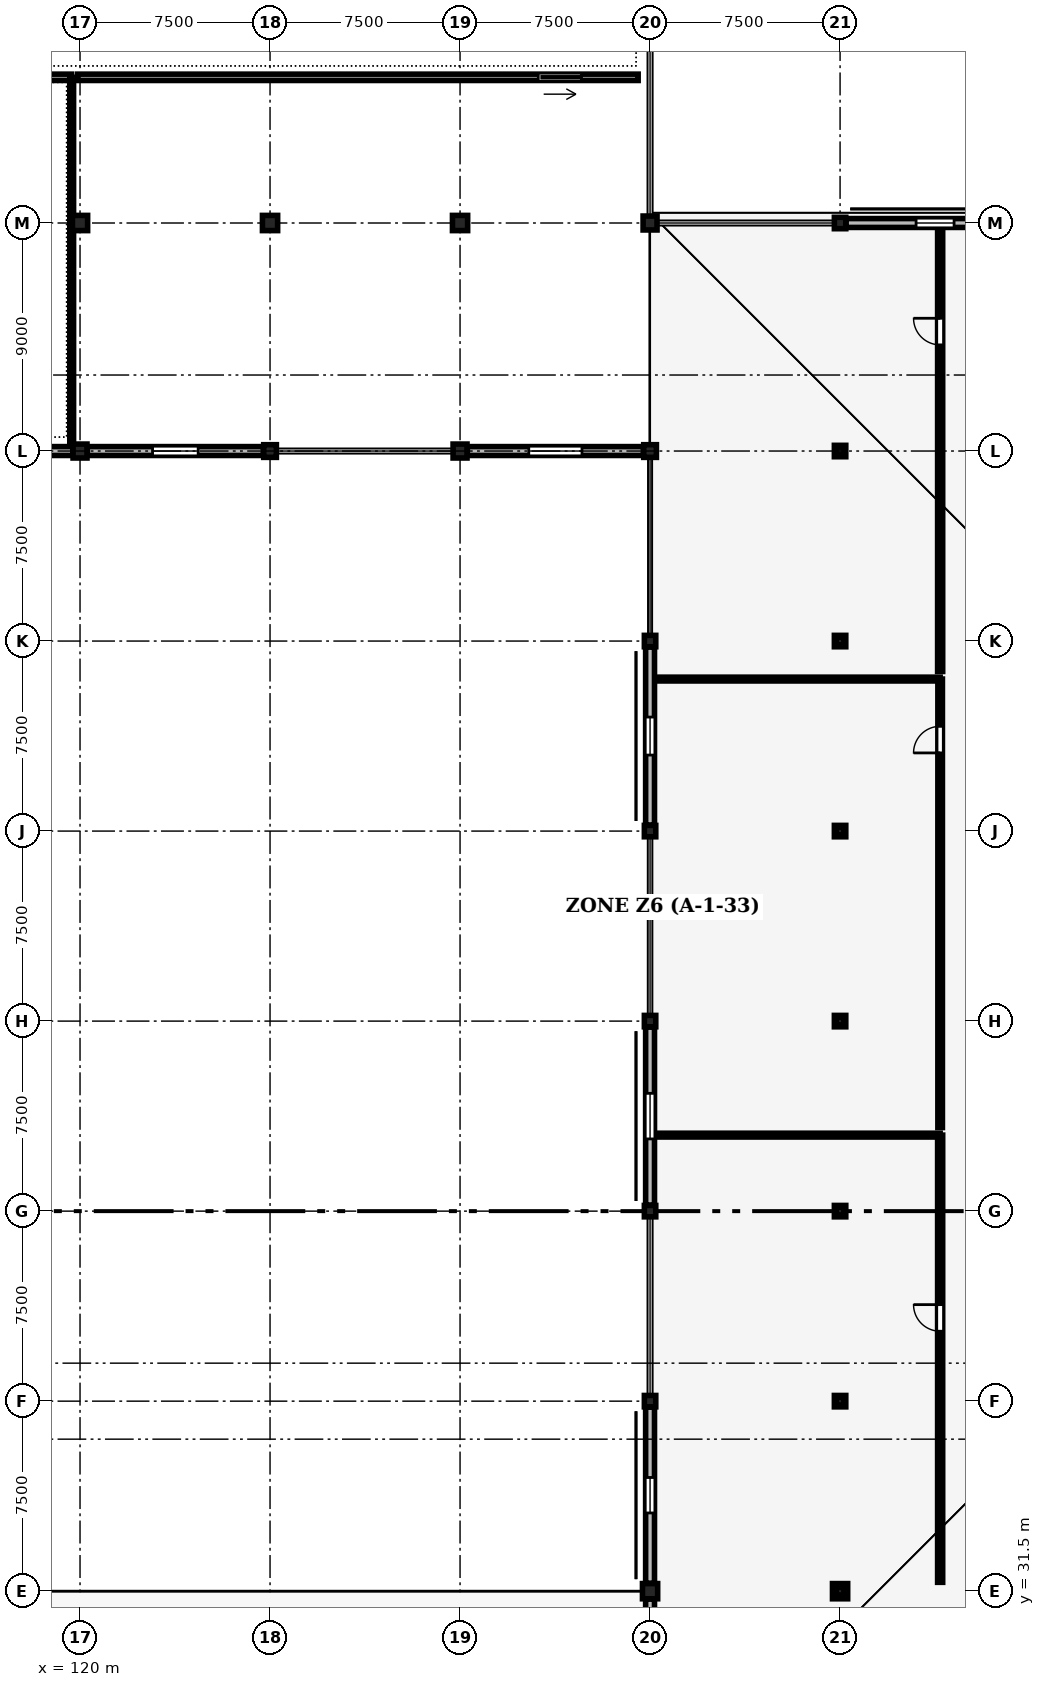
"""IFC4 building model, lengths in metres.
Left out: names, types, materials, properties, quantities, classifications, styles, units other than length and angle.
Written with IfcOpenShell. Run it as: python <this file> out.ifc"""

import sys

from ifc_helpers import new_model, si_unit, direction, frame, frame_2d, origin, origin_2d, place, context, subcontext, project, spatial, rectangle, circle, i_section, extrude, element, fill, save


model = new_model("IFC4")
c1 = context("Model", 3, precision=1e-05, world=origin(), true_north=direction((0.0, 1.0)))
c2 = subcontext(c1, "Body", "Model", "MODEL_VIEW")
j1 = project(units=[si_unit("LENGTHUNIT", "METRE"), si_unit("PLANEANGLEUNIT", "RADIAN")], contexts=[c1])
p1 = place(None, origin())
s1 = spatial("IfcSite", under=j1, at=p1, CompositionType="ELEMENT")
p2 = place(p1, origin())
s2 = spatial("IfcBuilding", under=s1, at=p2, CompositionType="ELEMENT")
p3 = place(p2, frame((0.0, 0.0, 9.3)))
s3 = spatial("IfcBuildingStorey", under=s2, at=p3, CompositionType="ELEMENT", Elevation=9.3)
p4 = place(p3, frame((120.0, 76.5, 0.0), z_axis=(0.0, 0.0, 1.0), x_axis=(1.0, 0.0, 0.0)))
e1 = element("IfcColumn", 1, at=p4, inside=s3, PredefinedType="COLUMN", context=c2, shape_type="SweptSolid", body=[
    extrude(rectangle(XDim=0.55, YDim=0.55, at=origin_2d()), origin(), (0.0, 0.0, 1.0), 4.8),
])
p5 = place(p3, frame((120.0, 85.5, 0.0), z_axis=(0.0, 0.0, 1.0), x_axis=(1.0, 0.0, 0.0)))
e2 = element("IfcColumn", 2, at=p5, inside=s3, PredefinedType="COLUMN", context=c2, shape_type="SweptSolid", body=[
    extrude(circle(Radius=0.3, at=origin_2d()), origin(), (0.0, 0.0, 1.0), 4.8),
])
p6 = place(p3, frame((127.5, 76.5, 0.0), z_axis=(0.0, 0.0, 1.0), x_axis=(1.0, 0.0, 0.0)))
e3 = element("IfcColumn", 3, at=p6, inside=s3, PredefinedType="COLUMN", context=c2, shape_type="SweptSolid", body=[
    extrude(rectangle(XDim=0.5, YDim=0.5, at=origin_2d()), origin(), (0.0, 0.0, 1.0), 4.8),
])
p7 = place(p3, frame((127.5, 85.5, 0.0), z_axis=(0.0, 0.0, 1.0), x_axis=(1.0, 0.0, 0.0)))
e4 = element("IfcColumn", 4, at=p7, inside=s3, PredefinedType="COLUMN", context=c2, shape_type="SweptSolid", body=[
    extrude(rectangle(XDim=0.6, YDim=0.6, at=origin_2d()), origin(), (0.0, 0.0, 1.0), 4.8),
])
p8 = place(p3, frame((135.0, 76.5, 0.0), z_axis=(0.0, 0.0, 1.0), x_axis=(1.0, 0.0, 0.0)))
e5 = element("IfcColumn", 5, at=p8, inside=s3, PredefinedType="COLUMN", context=c2, shape_type="SweptSolid", body=[
    extrude(rectangle(XDim=0.55, YDim=0.55, at=origin_2d()), origin(), (0.0, 0.0, 1.0), 4.8),
])
for number, where, z_axis, x_axis in (
    (6, (135.0, 85.5, 0.0), (0.0, 0.0, 1.0), (1.0, 0.0, 0.0)),
    (7, (142.5, 31.5, 0.0), (0.0, 0.0, 1.0), (1.0, 0.0, 0.0)),
):
    element("IfcColumn", number, at=place(p3, frame(where, z_axis=z_axis, x_axis=x_axis)), inside=s3, PredefinedType="COLUMN", context=c2, shape_type="SweptSolid", body=[
        extrude(rectangle(XDim=0.6, YDim=0.6, at=origin_2d()), origin(), (0.0, 0.0, 1.0), 4.8),
    ])
for number, where, z_axis, x_axis in (
    (8, (142.5, 39.0, 0.0), (0.0, 0.0, 1.0), (1.0, 0.0, 0.0)),
    (9, (142.5, 46.5, 0.0), (0.0, 0.0, 1.0), (1.0, 0.0, 0.0)),
    (10, (142.5, 54.0, 0.0), (0.0, 0.0, 1.0), (1.0, 0.0, 0.0)),
    (11, (142.5, 61.5, 0.0), (0.0, 0.0, 1.0), (1.0, 0.0, 0.0)),
    (12, (142.5, 69.0, 0.0), (0.0, 0.0, 1.0), (1.0, 0.0, 0.0)),
):
    element("IfcColumn", number, at=place(p3, frame(where, z_axis=z_axis, x_axis=x_axis)), inside=s3, PredefinedType="COLUMN", context=c2, shape_type="SweptSolid", body=[
        extrude(rectangle(XDim=0.45, YDim=0.45, at=origin_2d()), origin(), (0.0, 0.0, 1.0), 4.8),
    ])
p9 = place(p3, frame((142.5, 76.5, 0.0), z_axis=(0.0, 0.0, 1.0), x_axis=(1.0, 0.0, 0.0)))
e13 = element("IfcColumn", 13, at=p9, inside=s3, PredefinedType="COLUMN", context=c2, shape_type="SweptSolid", body=[
    extrude(rectangle(XDim=0.5, YDim=0.5, at=origin_2d()), origin(), (0.0, 0.0, 1.0), 4.8),
])
p10 = place(p3, frame((142.5, 85.5, 0.0), z_axis=(0.0, 0.0, 1.0), x_axis=(1.0, 0.0, 0.0)))
e14 = element("IfcColumn", 14, at=p10, inside=s3, PredefinedType="COLUMN", context=c2, shape_type="SweptSolid", body=[
    extrude(rectangle(XDim=0.55, YDim=0.55, at=origin_2d()), origin(), (0.0, 0.0, 1.0), 4.8),
])
p11 = place(p3, frame((150.0, 31.5, 0.0), z_axis=(0.0, 0.0, 1.0), x_axis=(1.0, 0.0, 0.0)))
e15 = element("IfcColumn", 15, at=p11, inside=s3, PredefinedType="COLUMN", context=c2, shape_type="SweptSolid", body=[
    extrude(circle(Radius=0.3, at=origin_2d()), origin(), (0.0, 0.0, 1.0), 4.8),
])
for number, where, z_axis, x_axis in (
    (16, (150.0, 39.0, 0.0), (0.0, 0.0, 1.0), (1.0, 0.0, 0.0)),
    (17, (150.0, 46.5, 0.0), (0.0, 0.0, 1.0), (1.0, 0.0, 0.0)),
    (18, (150.0, 54.0, 0.0), (0.0, 0.0, 1.0), (1.0, 0.0, 0.0)),
    (19, (150.0, 61.5, 0.0), (0.0, 0.0, 1.0), (1.0, 0.0, 0.0)),
    (20, (150.0, 69.0, 0.0), (0.0, 0.0, 1.0), (1.0, 0.0, 0.0)),
    (21, (150.0, 76.5, 0.0), (0.0, 0.0, 1.0), (1.0, 0.0, 0.0)),
    (22, (150.0, 85.5, 0.0), (0.0, 0.0, 1.0), (1.0, 0.0, 0.0)),
):
    element("IfcColumn", number, at=place(p3, frame(where, z_axis=z_axis, x_axis=x_axis)), inside=s3, PredefinedType="COLUMN", context=c2, shape_type="SweptSolid", body=[
        extrude(rectangle(XDim=0.45, YDim=0.45, at=origin_2d()), origin(), (0.0, 0.0, 1.0), 4.8),
    ])
for number, where, z_axis, x_axis in (
    (23, (150.0, 31.5, 4.8), (0.0, 0.0, 1.0), (1.0, 0.0, 0.0)),
    (24, (150.0, 39.0, 4.8), (0.0, 0.0, 1.0), (1.0, 0.0, 0.0)),
    (25, (150.0, 46.5, 4.8), (0.0, 0.0, 1.0), (1.0, 0.0, 0.0)),
    (26, (150.0, 54.0, 4.8), (0.0, 0.0, 1.0), (1.0, 0.0, 0.0)),
    (27, (150.0, 61.5, 4.8), (0.0, 0.0, 1.0), (1.0, 0.0, 0.0)),
    (28, (150.0, 69.0, 4.8), (0.0, 0.0, 1.0), (1.0, 0.0, 0.0)),
    (29, (150.0, 76.5, 4.8), (0.0, 0.0, 1.0), (1.0, 0.0, 0.0)),
):
    element("IfcColumn", number, at=place(p3, frame(where, z_axis=z_axis, x_axis=x_axis)), inside=s3, PredefinedType="COLUMN", context=c2, shape_type="SweptSolid", body=[
        extrude(i_section(OverallWidth=0.3, OverallDepth=0.3, WebThickness=0.011, FlangeThickness=0.019, FilletRadius=0.027, at=origin_2d()), origin(), (0.0, 0.0, 1.0), 1.872),
    ])
p12 = place(p3, frame((119.715, 76.5, 0.0), z_axis=(0.0, 0.0, 1.0), x_axis=(-1.0, 0.0, 0.0)))
e30 = element("IfcWall", 30, at=p12, inside=s3, PredefinedType="STANDARD", context=c2, shape_type="SweptSolid", body=[
    extrude(rectangle(XDim=6.955, YDim=0.35, at=frame_2d((3.478, 0.0))), origin(), (0.0, 0.0, 1.0), 3.95),
])
p13 = place(p12, frame((2.577, 0.0, 0.9)))
e31 = element("IfcOpeningElement", 31, at=p13, cuts=e30, PredefinedType="OPENING", context=c2, shape_type="SweptSolid", body=[
    extrude(rectangle(XDim=1.8, YDim=1.8, at=frame_2d((0.9, 0.9))), frame((0.0, 0.185, 0.0), z_axis=(0.0, -1.0, 0.0), x_axis=(1.0, 0.0, 0.0)), (0.0, 0.0, 1.0), 0.37),
])
p14 = place(p3, frame((127.24, 76.5, 0.0), z_axis=(0.0, 0.0, 1.0), x_axis=(-1.0, 0.0, 0.0)))
e32 = element("IfcWall", 32, at=p14, inside=s3, PredefinedType="STANDARD", context=c2, shape_type="SweptSolid", body=[
    extrude(rectangle(XDim=6.955, YDim=0.35, at=frame_2d((3.478, 0.0))), origin(), (0.0, 0.0, 1.0), 3.95),
])
p15 = place(p14, frame((2.577, 0.0, 0.9)))
e33 = element("IfcOpeningElement", 33, at=p15, cuts=e32, PredefinedType="OPENING", context=c2, shape_type="SweptSolid", body=[
    extrude(rectangle(XDim=1.8, YDim=2.4, at=frame_2d((0.9, 1.2))), frame((0.0, 0.185, 0.0), z_axis=(0.0, -1.0, 0.0), x_axis=(1.0, 0.0, 0.0)), (0.0, 0.0, 1.0), 0.37),
])
p16 = place(p3, frame((142.24, 76.5, 0.0), z_axis=(0.0, 0.0, 1.0), x_axis=(-1.0, 0.0, 0.0)))
e34 = element("IfcWall", 34, at=p16, inside=s3, PredefinedType="STANDARD", context=c2, shape_type="SweptSolid", body=[
    extrude(rectangle(XDim=6.955, YDim=0.35, at=frame_2d((3.478, 0.0))), origin(), (0.0, 0.0, 1.0), 3.95),
])
p17 = place(p16, frame((2.427, 0.0, 0.9)))
e35 = element("IfcOpeningElement", 35, at=p17, cuts=e34, PredefinedType="OPENING", context=c2, shape_type="SweptSolid", body=[
    extrude(rectangle(XDim=2.1, YDim=2.4, at=frame_2d((1.05, 1.2))), frame((0.0, 0.185, 0.0), z_axis=(0.0, -1.0, 0.0), x_axis=(1.0, 0.0, 0.0)), (0.0, 0.0, 1.0), 0.37),
])
p18 = place(p3, frame((142.5, 22.86, 0.0), z_axis=(0.0, 0.0, 1.0), x_axis=(0.0, 1.0, 0.0)))
e36 = element("IfcWall", 36, at=p18, inside=s3, PredefinedType="STANDARD", context=c2, shape_type="SweptSolid", body=[
    extrude(rectangle(XDim=8.33, YDim=0.35, at=frame_2d((4.165, 0.0))), origin(), (0.0, 0.0, 1.0), 4.55),
])
p19 = place(p18, frame((3.565, 0.0, 0.0)))
e37 = element("IfcOpeningElement", 37, at=p19, cuts=e36, PredefinedType="OPENING", context=c2, shape_type="SweptSolid", body=[
    extrude(rectangle(XDim=1.2, YDim=2.3, at=frame_2d((0.6, 1.15))), frame((0.0, 0.185, 0.0), z_axis=(0.0, -1.0, 0.0), x_axis=(1.0, 0.0, 0.0)), (0.0, 0.0, 1.0), 0.37),
])
p20 = place(p3, frame((142.5, 31.81, 0.0), z_axis=(0.0, 0.0, 1.0), x_axis=(0.0, 1.0, 0.0)))
e38 = element("IfcWall", 38, at=p20, inside=s3, PredefinedType="STANDARD", context=c2, shape_type="SweptSolid", body=[
    extrude(rectangle(XDim=6.955, YDim=0.35, at=frame_2d((3.478, 0.0))), origin(), (0.0, 0.0, 1.0), 4.55),
])
p21 = place(p20, frame((2.778, 0.0, 0.9)))
e39 = element("IfcOpeningElement", 39, at=p21, cuts=e38, PredefinedType="OPENING", context=c2, shape_type="SweptSolid", body=[
    extrude(rectangle(XDim=1.4, YDim=1.8, at=frame_2d((0.7, 0.9))), frame((0.0, 0.185, 0.0), z_axis=(0.0, -1.0, 0.0), x_axis=(1.0, 0.0, 0.0)), (0.0, 0.0, 1.0), 0.37),
])
p22 = place(p3, frame((142.5, 46.735, 0.0), z_axis=(0.0, 0.0, 1.0), x_axis=(0.0, 1.0, 0.0)))
e40 = element("IfcWall", 40, at=p22, inside=s3, PredefinedType="STANDARD", context=c2, shape_type="SweptSolid", body=[
    extrude(rectangle(XDim=7.03, YDim=0.35, at=frame_2d((3.515, 0.0))), origin(), (0.0, 0.0, 1.0), 4.55),
])
p23 = place(p22, frame((2.615, 0.0, 0.9)))
e41 = element("IfcOpeningElement", 41, at=p23, cuts=e40, PredefinedType="OPENING", context=c2, shape_type="SweptSolid", body=[
    extrude(rectangle(XDim=1.8, YDim=1.8, at=frame_2d((0.9, 0.9))), frame((0.0, 0.185, 0.0), z_axis=(0.0, -1.0, 0.0), x_axis=(1.0, 0.0, 0.0)), (0.0, 0.0, 1.0), 0.37),
])
p24 = place(p3, frame((142.5, 61.735, 0.0), z_axis=(0.0, 0.0, 1.0), x_axis=(0.0, 1.0, 0.0)))
e42 = element("IfcWall", 42, at=p24, inside=s3, PredefinedType="STANDARD", context=c2, shape_type="SweptSolid", body=[
    extrude(rectangle(XDim=7.03, YDim=0.35, at=frame_2d((3.515, 0.0))), origin(), (0.0, 0.0, 1.0), 4.55),
])
p25 = place(p24, frame((2.765, 0.0, 0.9)))
e43 = element("IfcOpeningElement", 43, at=p25, cuts=e42, PredefinedType="OPENING", context=c2, shape_type="SweptSolid", body=[
    extrude(rectangle(XDim=1.5, YDim=2.4, at=frame_2d((0.75, 1.2))), frame((0.0, 0.185, 0.0), z_axis=(0.0, -1.0, 0.0), x_axis=(1.0, 0.0, 0.0)), (0.0, 0.0, 1.0), 0.37),
])
p26 = place(p3, frame((150.235, 85.5, 0.0), z_axis=(0.0, 0.0, 1.0), x_axis=(1.0, 0.0, 0.0)))
e44 = element("IfcWall", 44, at=p26, inside=s3, PredefinedType="STANDARD", context=c2, shape_type="SweptSolid", body=[
    extrude(rectangle(XDim=7.03, YDim=0.35, at=frame_2d((3.515, 0.0))), origin(), (0.0, 0.0, 1.0), 4.55),
])
p27 = place(p26, frame((2.765, 0.0, 0.9)))
e45 = element("IfcOpeningElement", 45, at=p27, cuts=e44, PredefinedType="OPENING", context=c2, shape_type="SweptSolid", body=[
    extrude(rectangle(XDim=1.5, YDim=2.1, at=frame_2d((0.75, 1.05))), frame((0.0, 0.185, 0.0), z_axis=(0.0, -1.0, 0.0), x_axis=(1.0, 0.0, 0.0)), (0.0, 0.0, 1.0), 0.37),
])
p28 = place(p3, frame((153.95, 31.85, 0.0), z_axis=(0.0, 0.0, 1.0), x_axis=(0.0, 1.0, 0.0)))
e46 = element("IfcWall", 46, at=p28, inside=s3, PredefinedType="STANDARD", context=c2, shape_type="SweptSolid", body=[
    extrude(rectangle(XDim=17.65, YDim=0.2, at=frame_2d((8.825, 0.0))), origin(), (0.0, 0.0, 1.0), 4.535),
])
p29 = place(p28, frame((9.91, 0.0, 0.0)))
e47 = element("IfcOpeningElement", 47, at=p29, cuts=e46, PredefinedType="OPENING", context=c2, shape_type="SweptSolid", body=[
    extrude(rectangle(XDim=1.05, YDim=2.2, at=frame_2d((0.525, 1.1))), frame((0.0, 0.11, 0.0), z_axis=(0.0, -1.0, 0.0), x_axis=(1.0, 0.0, 0.0)), (0.0, 0.0, 1.0), 0.22),
])
p30 = place(p3, frame((153.95, 49.8, 0.0), z_axis=(0.0, 0.0, 1.0), x_axis=(0.0, 1.0, 0.0)))
e48 = element("IfcWall", 48, at=p30, inside=s3, PredefinedType="PARTITIONING", context=c2, shape_type="SweptSolid", body=[
    extrude(rectangle(XDim=17.7, YDim=0.18, at=frame_2d((8.85, 0.0))), origin(), (0.0, 0.0, 1.0), 4.535),
])
p31 = place(p30, frame((14.785, 0.0, 0.0)))
e49 = element("IfcOpeningElement", 49, at=p31, cuts=e48, PredefinedType="OPENING", context=c2, shape_type="SweptSolid", body=[
    extrude(rectangle(XDim=1.05, YDim=2.2, at=frame_2d((0.525, 1.1))), frame((0.0, 0.1, 0.0), z_axis=(0.0, -1.0, 0.0), x_axis=(1.0, 0.0, 0.0)), (0.0, 0.0, 1.0), 0.2),
])
p32 = place(p3, frame((153.95, 67.8, 0.0), z_axis=(0.0, 0.0, 1.0), x_axis=(0.0, 1.0, 0.0)))
e50 = element("IfcWall", 50, at=p32, inside=s3, PredefinedType="STANDARD", context=c2, shape_type="SweptSolid", body=[
    extrude(rectangle(XDim=17.35, YDim=0.2, at=frame_2d((8.675, 0.0))), origin(), (0.0, 0.0, 1.0), 4.535),
])
p33 = place(p32, frame((12.89, 0.0, 0.0)))
e51 = element("IfcOpeningElement", 51, at=p33, cuts=e50, PredefinedType="OPENING", context=c2, shape_type="SweptSolid", body=[
    extrude(rectangle(XDim=1.05, YDim=2.2, at=frame_2d((0.525, 1.1))), frame((0.0, 0.11, 0.0), z_axis=(0.0, -1.0, 0.0), x_axis=(1.0, 0.0, 0.0)), (0.0, 0.0, 1.0), 0.22),
])
p34 = place(p3, frame((119.67, 91.25, 0.0), z_axis=(0.0, 0.0, 1.0), x_axis=(-1.0, 0.0, 0.0)))
e52 = element("IfcWall", 52, at=p34, inside=s3, PredefinedType="STANDARD", context=c2, shape_type="SweptSolid", body=[
    extrude(rectangle(XDim=22.12, YDim=0.25, at=frame_2d((11.06, 0.0))), origin(), (0.0, 0.0, 1.0), 4.535),
])
p35 = place(p34, frame((10.21, 0.0, 0.0)))
e53 = element("IfcOpeningElement", 53, at=p35, cuts=e52, PredefinedType="OPENING", context=c2, shape_type="SweptSolid", body=[
    extrude(rectangle(XDim=1.7, YDim=2.4, at=frame_2d((0.85, 1.2))), frame((0.0, 0.135, 0.0), z_axis=(0.0, -1.0, 0.0), x_axis=(1.0, 0.0, 0.0)), (0.0, 0.0, 1.0), 0.27),
])
p36 = place(p3, frame((142.03, 91.25, 0.0), z_axis=(0.0, 0.0, 1.0), x_axis=(-1.0, 0.0, 0.0)))
e54 = element("IfcWall", 54, at=p36, inside=s3, PredefinedType="STANDARD", context=c2, shape_type="SweptSolid", body=[
    extrude(rectangle(XDim=22.12, YDim=0.25, at=frame_2d((11.06, 0.0))), origin(), (0.0, 0.0, 1.0), 4.535),
])
p37 = place(p36, frame((2.242, 0.0, 0.0)))
e55 = element("IfcOpeningElement", 55, at=p37, cuts=e54, PredefinedType="OPENING", context=c2, shape_type="SweptSolid", body=[
    extrude(rectangle(XDim=1.7, YDim=2.4, at=frame_2d((0.85, 1.2))), frame((0.0, 0.135, 0.0), z_axis=(0.0, -1.0, 0.0), x_axis=(1.0, 0.0, 0.0)), (0.0, 0.0, 1.0), 0.27),
])
for number, where, z_axis, x_axis in (
    (56, (142.85, 49.5, 0.0), (0.0, 0.0, 1.0), (1.0, 0.0, 0.0)),
    (57, (142.85, 67.5, 0.0), (0.0, 0.0, 1.0), (1.0, 0.0, 0.0)),
):
    element("IfcWall", number, at=place(p3, frame(where, z_axis=z_axis, x_axis=x_axis)), inside=s3, PredefinedType="PARTITIONING", context=c2, shape_type="SweptSolid", body=[
        extrude(rectangle(XDim=11.1, YDim=0.15, at=frame_2d((5.55, 0.0))), origin(), (0.0, 0.0, 1.0), 4.535),
    ])
p38 = place(p3, frame((119.67, 76.85, 0.0), z_axis=(0.0, 0.0, 1.0), x_axis=(0.0, 1.0, 0.0)))
e58 = element("IfcWall", 58, at=p38, inside=s3, PredefinedType="PARTITIONING", context=c2, shape_type="SweptSolid", body=[
    extrude(rectangle(XDim=14.4, YDim=0.15, at=frame_2d((7.2, 0.0))), origin(), (0.0, 0.0, 1.0), 3.835),
])
p39 = place(p15, origin())
e59 = element("IfcWindow", 59, at=p39, inside=s3, PartitioningType="SINGLE_PANEL", PredefinedType="WINDOW", context=c2, shape_type="SweptSolid", body=[
    extrude(rectangle(XDim=1.8, YDim=2.4, at=frame_2d((0.9, 1.2))), frame((0.0, 0.03, 0.0), z_axis=(0.0, -1.0, 0.0), x_axis=(1.0, 0.0, 0.0)), (0.0, 0.0, 1.0), 0.06),
])
fill(e33, e59)
p40 = place(p17, origin())
e60 = element("IfcWindow", 60, at=p40, inside=s3, PartitioningType="SINGLE_PANEL", PredefinedType="WINDOW", context=c2, shape_type="SweptSolid", body=[
    extrude(rectangle(XDim=2.1, YDim=2.4, at=frame_2d((1.05, 1.2))), frame((0.0, 0.03, 0.0), z_axis=(0.0, -1.0, 0.0), x_axis=(1.0, 0.0, 0.0)), (0.0, 0.0, 1.0), 0.06),
])
fill(e35, e60)
p41 = place(p21, origin())
e61 = element("IfcWindow", 61, at=p41, inside=s3, PartitioningType="SINGLE_PANEL", PredefinedType="WINDOW", context=c2, shape_type="SweptSolid", body=[
    extrude(rectangle(XDim=1.4, YDim=1.8, at=frame_2d((0.7, 0.9))), frame((0.0, 0.03, 0.0), z_axis=(0.0, -1.0, 0.0), x_axis=(1.0, 0.0, 0.0)), (0.0, 0.0, 1.0), 0.06),
])
fill(e39, e61)
p42 = place(p23, origin())
e62 = element("IfcWindow", 62, at=p42, inside=s3, PartitioningType="SINGLE_PANEL", PredefinedType="WINDOW", context=c2, shape_type="SweptSolid", body=[
    extrude(rectangle(XDim=1.8, YDim=1.8, at=frame_2d((0.9, 0.9))), frame((0.0, 0.03, 0.0), z_axis=(0.0, -1.0, 0.0), x_axis=(1.0, 0.0, 0.0)), (0.0, 0.0, 1.0), 0.06),
])
fill(e41, e62)
p43 = place(p25, origin())
e63 = element("IfcWindow", 63, at=p43, inside=s3, PartitioningType="SINGLE_PANEL", PredefinedType="WINDOW", context=c2, shape_type="SweptSolid", body=[
    extrude(rectangle(XDim=1.5, YDim=2.4, at=frame_2d((0.75, 1.2))), frame((0.0, 0.03, 0.0), z_axis=(0.0, -1.0, 0.0), x_axis=(1.0, 0.0, 0.0)), (0.0, 0.0, 1.0), 0.06),
])
fill(e43, e63)
p44 = place(p27, origin())
e64 = element("IfcWindow", 64, at=p44, inside=s3, PartitioningType="SINGLE_PANEL", PredefinedType="WINDOW", context=c2, shape_type="SweptSolid", body=[
    extrude(rectangle(XDim=1.5, YDim=2.1, at=frame_2d((0.75, 1.05))), frame((0.0, 0.03, 0.0), z_axis=(0.0, -1.0, 0.0), x_axis=(1.0, 0.0, 0.0)), (0.0, 0.0, 1.0), 0.06),
])
fill(e45, e64)
p45 = place(p29, origin())
e65 = element("IfcDoor", 65, at=p45, inside=s3, OperationType="SINGLE_SWING_RIGHT", PredefinedType="DOOR", context=c2, shape_type="SweptSolid", body=[
    extrude(rectangle(XDim=1.05, YDim=2.2, at=frame_2d((0.525, 1.1))), frame((0.0, 0.025, 0.0), z_axis=(0.0, -1.0, 0.0), x_axis=(1.0, 0.0, 0.0)), (0.0, 0.0, 1.0), 0.05),
])
fill(e47, e65)
p46 = place(p31, origin())
e66 = element("IfcDoor", 66, at=p46, inside=s3, OperationType="SINGLE_SWING_LEFT", PredefinedType="DOOR", context=c2, shape_type="SweptSolid", body=[
    extrude(rectangle(XDim=1.05, YDim=2.2, at=frame_2d((0.525, 1.1))), frame((0.0, 0.025, 0.0), z_axis=(0.0, -1.0, 0.0), x_axis=(1.0, 0.0, 0.0)), (0.0, 0.0, 1.0), 0.05),
])
fill(e49, e66)
p47 = place(p33, origin())
e67 = element("IfcDoor", 67, at=p47, inside=s3, OperationType="SINGLE_SWING_RIGHT", PredefinedType="DOOR", context=c2, shape_type="SweptSolid", body=[
    extrude(rectangle(XDim=1.05, YDim=2.2, at=frame_2d((0.525, 1.1))), frame((0.0, 0.025, 0.0), z_axis=(0.0, -1.0, 0.0), x_axis=(1.0, 0.0, 0.0)), (0.0, 0.0, 1.0), 0.05),
])
fill(e51, e67)
p48 = place(p37, origin())
e68 = element("IfcDoor", 68, at=p48, inside=s3, OperationType="DOUBLE_DOOR_SLIDING", PredefinedType="DOOR", context=c2, shape_type="SweptSolid", body=[
    extrude(rectangle(XDim=1.7, YDim=2.4, at=frame_2d((0.85, 1.2))), frame((0.0, 0.025, 0.0), z_axis=(0.0, -1.0, 0.0), x_axis=(1.0, 0.0, 0.0)), (0.0, 0.0, 1.0), 0.05),
])
fill(e55, e68)
save(model, sys.argv[1])
